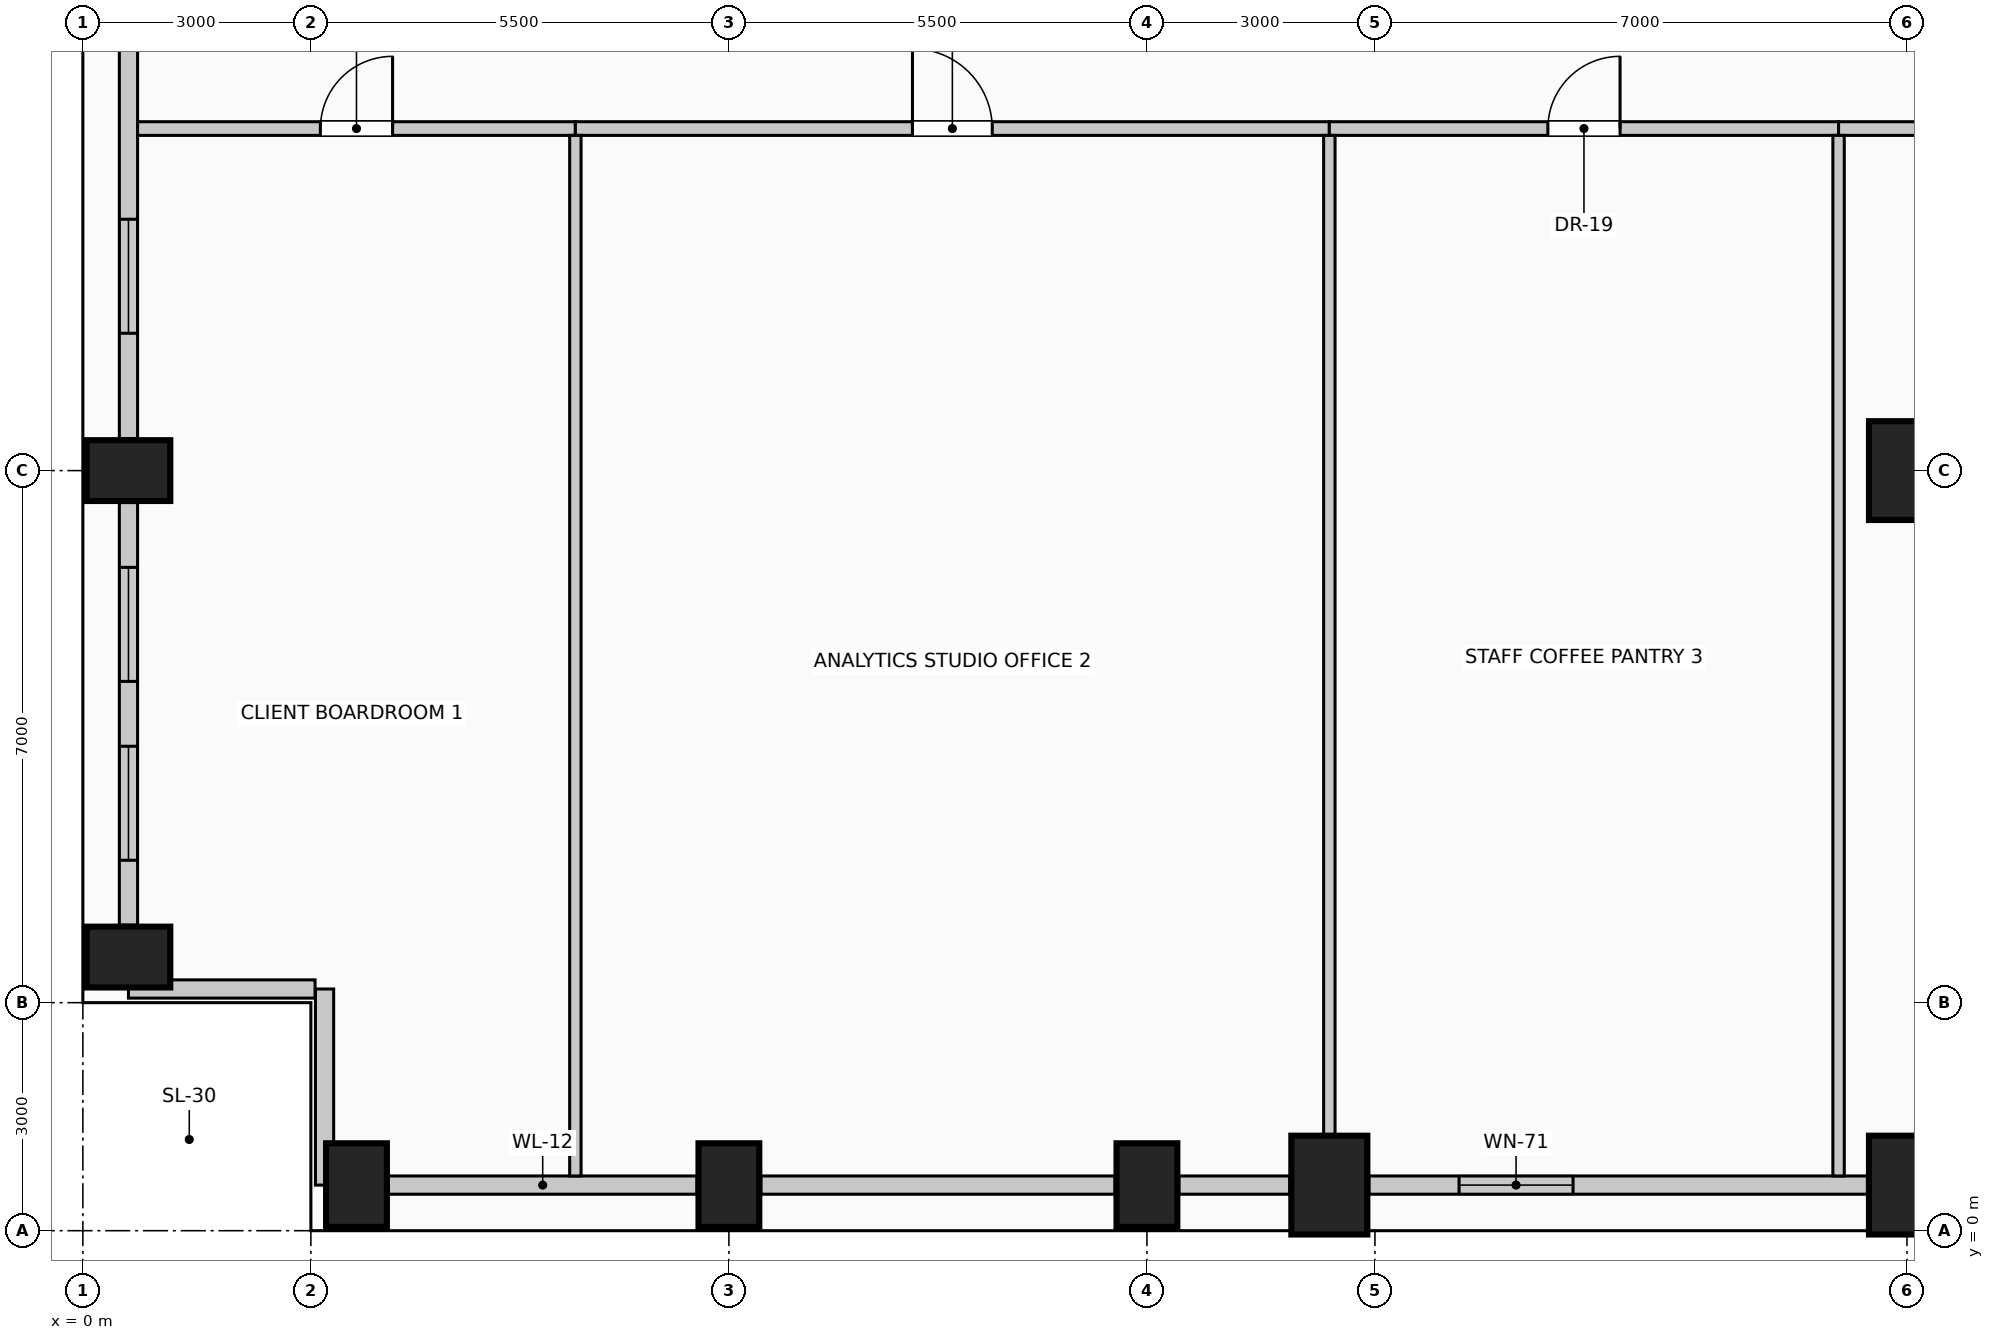
"""IFC4 building model, lengths in metres.
Left out: names, types, materials, properties, quantities, classifications, styles, units other than length and angle.
Written with IfcOpenShell. Run it as: python <this file> out.ifc"""

import sys

from ifc_helpers import new_model, si_unit, direction, frame, frame_2d, origin, origin_2d, place, context, subcontext, project, spatial, rectangle, extrude, element, fill, save


model = new_model("IFC4")
c1 = context("Model", 3, precision=1e-05, world=origin(), true_north=direction((0.0, 1.0)))
c2 = subcontext(c1, "Body", "Model", "MODEL_VIEW")
j1 = project(units=[si_unit("LENGTHUNIT", "METRE"), si_unit("PLANEANGLEUNIT", "RADIAN")], contexts=[c1])
p1 = place(None, origin())
s1 = spatial("IfcSite", under=j1, at=p1, CompositionType="ELEMENT")
p2 = place(p1, origin())
s2 = spatial("IfcBuilding", under=s1, at=p2, CompositionType="ELEMENT")
p3 = place(p2, frame((0.0, 0.0, 210.6)))
s3 = spatial("IfcBuildingStorey", under=s2, at=p3, CompositionType="ELEMENT", Elevation=210.6)
for number, where, z_axis, x_axis in (
    (1, (3.6, 0.6, 0.0), (0.0, 0.0, 1.0), (1.0, 0.0, 0.0)),
    (2, (8.5, 0.6, 0.0), (0.0, 0.0, 1.0), (1.0, 0.0, 0.0)),
    (3, (14.0, 0.6, 0.0), (0.0, 0.0, 1.0), (1.0, 0.0, 0.0)),
):
    element("IfcColumn", number, at=place(p3, frame(where, z_axis=z_axis, x_axis=x_axis)), inside=s3, PredefinedType="COLUMN", context=c2, shape_type="SweptSolid", body=[
        extrude(rectangle(XDim=0.8, YDim=1.1, at=origin_2d()), origin(), (0.0, 0.0, 1.0), 4.0),
    ])
for number, where, z_axis, x_axis in (
    (4, (16.4, 0.6, 0.0), (0.0, 0.0, 1.0), (1.0, 0.0, 0.0)),
    (5, (24.0, 0.6, 0.0), (0.0, 0.0, 1.0), (1.0, 0.0, 0.0)),
):
    element("IfcColumn", number, at=place(p3, frame(where, z_axis=z_axis, x_axis=x_axis)), inside=s3, PredefinedType="COLUMN", context=c2, shape_type="SweptSolid", body=[
        extrude(rectangle(XDim=1.0, YDim=1.3, at=origin_2d()), origin(), (0.0, 0.0, 1.0), 4.0),
    ])
for number, where, z_axis, x_axis in (
    (6, (0.6, 3.6, 0.0), (0.0, 0.0, 1.0), (0.0, 1.0, 0.0)),
    (7, (0.6, 10.0, 0.0), (0.0, 0.0, 1.0), (0.0, 1.0, 0.0)),
):
    element("IfcColumn", number, at=place(p3, frame(where, z_axis=z_axis, x_axis=x_axis)), inside=s3, PredefinedType="COLUMN", context=c2, shape_type="SweptSolid", body=[
        extrude(rectangle(XDim=0.8, YDim=1.1, at=origin_2d()), origin(), (0.0, 0.0, 1.0), 4.0),
    ])
p4 = place(p3, frame((24.0, 10.0, 0.0), z_axis=(0.0, 0.0, 1.0), x_axis=(1.0, 0.0, 0.0)))
e8 = element("IfcColumn", 8, at=p4, inside=s3, PredefinedType="COLUMN", context=c2, shape_type="SweptSolid", body=[
    extrude(rectangle(XDim=1.0, YDim=1.3, at=origin_2d()), origin(), (0.0, 0.0, 1.0), 4.0),
])
p5 = place(p3, frame((8.08, 0.6, 0.0), z_axis=(0.0, 0.0, 1.0), x_axis=(-1.0, 0.0, 0.0)))
e9 = element("IfcWall", 9, at=p5, inside=s3, PredefinedType="SOLIDWALL", context=c2, shape_type="SweptSolid", body=[
    extrude(rectangle(XDim=4.06, YDim=0.24, at=frame_2d((2.03, 0.0))), origin(), (0.0, 0.0, 1.0), 3.0),
])
p6 = place(p3, frame((13.58, 0.6, 0.0), z_axis=(0.0, 0.0, 1.0), x_axis=(-1.0, 0.0, 0.0)))
e10 = element("IfcWall", 10, at=p6, inside=s3, PredefinedType="SOLIDWALL", context=c2, shape_type="SweptSolid", body=[
    extrude(rectangle(XDim=4.66, YDim=0.24, at=frame_2d((2.33, 0.0))), origin(), (0.0, 0.0, 1.0), 3.0),
])
p7 = place(p3, frame((15.88, 0.6, 0.0), z_axis=(0.0, 0.0, 1.0), x_axis=(-1.0, 0.0, 0.0)))
e11 = element("IfcWall", 11, at=p7, inside=s3, PredefinedType="SOLIDWALL", context=c2, shape_type="SweptSolid", body=[
    extrude(rectangle(XDim=1.46, YDim=0.24, at=frame_2d((0.73, 0.0))), origin(), (0.0, 0.0, 1.0), 3.0),
])
p8 = place(p3, frame((23.48, 0.6, 0.0), z_axis=(0.0, 0.0, 1.0), x_axis=(-1.0, 0.0, 0.0)))
e12 = element("IfcWall", 12, at=p8, inside=s3, PredefinedType="SOLIDWALL", context=c2, shape_type="SweptSolid", body=[
    extrude(rectangle(XDim=6.56, YDim=0.24, at=frame_2d((3.28, 0.0))), origin(), (0.0, 0.0, 1.0), 3.0),
])
p9 = place(p8, frame((3.873, 0.0, 0.42)))
e13 = element("IfcOpeningElement", 13, at=p9, cuts=e12, PredefinedType="OPENING", context=c2, shape_type="SweptSolid", body=[
    extrude(rectangle(XDim=1.5, YDim=2.2, at=frame_2d((0.75, 1.1))), frame((0.0, 0.13, 0.0), z_axis=(0.0, -1.0, 0.0), x_axis=(1.0, 0.0, 0.0)), (0.0, 0.0, 1.0), 0.26),
])
p10 = place(p3, frame((0.6, 4.02, 0.0), z_axis=(0.0, 0.0, 1.0), x_axis=(0.0, 1.0, 0.0)))
e14 = element("IfcWall", 14, at=p10, inside=s3, PredefinedType="SOLIDWALL", context=c2, shape_type="SweptSolid", body=[
    extrude(rectangle(XDim=5.56, YDim=0.24, at=frame_2d((2.78, 0.0))), origin(), (0.0, 0.0, 1.0), 3.0),
])
p11 = place(p10, frame((0.853, 0.0, 0.42)))
e15 = element("IfcOpeningElement", 15, at=p11, cuts=e14, PredefinedType="OPENING", context=c2, shape_type="SweptSolid", body=[
    extrude(rectangle(XDim=1.5, YDim=2.2, at=frame_2d((0.75, 1.1))), frame((0.0, 0.13, 0.0), z_axis=(0.0, -1.0, 0.0), x_axis=(1.0, 0.0, 0.0)), (0.0, 0.0, 1.0), 0.26),
])
p12 = place(p10, frame((3.207, 0.0, 0.42)))
e16 = element("IfcOpeningElement", 16, at=p12, cuts=e14, PredefinedType="OPENING", context=c2, shape_type="SweptSolid", body=[
    extrude(rectangle(XDim=1.5, YDim=2.2, at=frame_2d((0.75, 1.1))), frame((0.0, 0.13, 0.0), z_axis=(0.0, -1.0, 0.0), x_axis=(1.0, 0.0, 0.0)), (0.0, 0.0, 1.0), 0.26),
])
p13 = place(p3, frame((0.6, 10.42, 0.0), z_axis=(0.0, 0.0, 1.0), x_axis=(0.0, 1.0, 0.0)))
e17 = element("IfcWall", 17, at=p13, inside=s3, PredefinedType="SOLIDWALL", context=c2, shape_type="SweptSolid", body=[
    extrude(rectangle(XDim=7.16, YDim=0.24, at=frame_2d((3.58, 0.0))), origin(), (0.0, 0.0, 1.0), 3.0),
])
p14 = place(p13, frame((1.387, 0.0, 0.42)))
e18 = element("IfcOpeningElement", 18, at=p14, cuts=e17, PredefinedType="OPENING", context=c2, shape_type="SweptSolid", body=[
    extrude(rectangle(XDim=1.5, YDim=2.2, at=frame_2d((0.75, 1.1))), frame((0.0, 0.13, 0.0), z_axis=(0.0, -1.0, 0.0), x_axis=(1.0, 0.0, 0.0)), (0.0, 0.0, 1.0), 0.26),
])
p15 = place(p3, frame((3.18, 0.6, 0.0), z_axis=(0.0, 0.0, 1.0), x_axis=(0.0, 1.0, 0.0)))
e19 = element("IfcWall", 19, at=p15, inside=s3, PredefinedType="SOLIDWALL", context=c2, shape_type="SweptSolid", body=[
    extrude(rectangle(XDim=2.58, YDim=0.24, at=frame_2d((1.29, 0.0))), origin(), (0.0, 0.0, 1.0), 3.75),
])
p16 = place(p3, frame((3.055, 3.18, 0.0), z_axis=(0.0, 0.0, 1.0), x_axis=(-1.0, 0.0, 0.0)))
e20 = element("IfcWall", 20, at=p16, inside=s3, PredefinedType="SOLIDWALL", context=c2, shape_type="SweptSolid", body=[
    extrude(rectangle(XDim=2.455, YDim=0.24, at=frame_2d((1.228, 0.0))), origin(), (0.0, 0.0, 1.0), 3.75),
])
p17 = place(p3, frame((0.72, 14.5, 0.0), z_axis=(0.0, 0.0, 1.0), x_axis=(1.0, 0.0, 0.0)))
e21 = element("IfcWall", 21, at=p17, inside=s3, PredefinedType="PARTITIONING", context=c2, shape_type="SweptSolid", body=[
    extrude(rectangle(XDim=5.76, YDim=0.18, at=frame_2d((2.88, 0.0))), origin(), (0.0, 0.0, 1.0), 3.75),
])
p18 = place(p17, frame((2.405, 0.0, 0.0)))
e22 = element("IfcOpeningElement", 22, at=p18, cuts=e21, PredefinedType="OPENING", context=c2, shape_type="SweptSolid", body=[
    extrude(rectangle(XDim=0.95, YDim=2.15, at=frame_2d((0.475, 1.075))), frame((0.0, 0.1, 0.0), z_axis=(0.0, -1.0, 0.0), x_axis=(1.0, 0.0, 0.0)), (0.0, 0.0, 1.0), 0.2),
])
p19 = place(p3, frame((6.48, 14.5, 0.0), z_axis=(0.0, 0.0, 1.0), x_axis=(1.0, 0.0, 0.0)))
e23 = element("IfcWall", 23, at=p19, inside=s3, PredefinedType="PARTITIONING", context=c2, shape_type="SweptSolid", body=[
    extrude(rectangle(XDim=9.92, YDim=0.18, at=frame_2d((4.96, 0.0))), origin(), (0.0, 0.0, 1.0), 3.75),
])
p20 = place(p19, frame((4.435, 0.0, 0.0)))
e24 = element("IfcOpeningElement", 24, at=p20, cuts=e23, PredefinedType="OPENING", context=c2, shape_type="SweptSolid", body=[
    extrude(rectangle(XDim=1.05, YDim=2.15, at=frame_2d((0.525, 1.075))), frame((0.0, 0.1, 0.0), z_axis=(0.0, -1.0, 0.0), x_axis=(1.0, 0.0, 0.0)), (0.0, 0.0, 1.0), 0.2),
])
p21 = place(p3, frame((16.4, 14.5, 0.0), z_axis=(0.0, 0.0, 1.0), x_axis=(1.0, 0.0, 0.0)))
e25 = element("IfcWall", 25, at=p21, inside=s3, PredefinedType="PARTITIONING", context=c2, shape_type="SweptSolid", body=[
    extrude(rectangle(XDim=6.7, YDim=0.18, at=frame_2d((3.35, 0.0))), origin(), (0.0, 0.0, 1.0), 3.75),
])
p22 = place(p21, frame((2.875, 0.0, 0.0)))
e26 = element("IfcOpeningElement", 26, at=p22, cuts=e25, PredefinedType="OPENING", context=c2, shape_type="SweptSolid", body=[
    extrude(rectangle(XDim=0.95, YDim=2.15, at=frame_2d((0.475, 1.075))), frame((0.0, 0.1, 0.0), z_axis=(0.0, -1.0, 0.0), x_axis=(1.0, 0.0, 0.0)), (0.0, 0.0, 1.0), 0.2),
])
p23 = place(p3, frame((23.1, 14.5, 0.0), z_axis=(0.0, 0.0, 1.0), x_axis=(1.0, 0.0, 0.0)))
e27 = element("IfcWall", 27, at=p23, inside=s3, PredefinedType="PARTITIONING", context=c2, shape_type="SweptSolid", body=[
    extrude(rectangle(XDim=13.38, YDim=0.18, at=frame_2d((6.69, 0.0))), origin(), (0.0, 0.0, 1.0), 3.75),
])
p24 = place(p23, frame((6.165, 0.0, 0.0)))
e28 = element("IfcOpeningElement", 28, at=p24, cuts=e27, PredefinedType="OPENING", context=c2, shape_type="SweptSolid", body=[
    extrude(rectangle(XDim=1.05, YDim=2.15, at=frame_2d((0.525, 1.075))), frame((0.0, 0.1, 0.0), z_axis=(0.0, -1.0, 0.0), x_axis=(1.0, 0.0, 0.0)), (0.0, 0.0, 1.0), 0.2),
])
p25 = place(p3, frame((6.48, 0.72, 0.0), z_axis=(0.0, 0.0, 1.0), x_axis=(0.0, 1.0, 0.0)))
e29 = element("IfcWall", 29, at=p25, inside=s3, PredefinedType="PARTITIONING", context=c2, shape_type="SweptSolid", body=[
    extrude(rectangle(XDim=13.69, YDim=0.15, at=frame_2d((6.845, 0.0))), origin(), (0.0, 0.0, 1.0), 3.75),
])
p26 = place(p3, frame((16.4, 1.25, 0.0), z_axis=(0.0, 0.0, 1.0), x_axis=(0.0, 1.0, 0.0)))
e30 = element("IfcWall", 30, at=p26, inside=s3, PredefinedType="PARTITIONING", context=c2, shape_type="SweptSolid", body=[
    extrude(rectangle(XDim=13.16, YDim=0.15, at=frame_2d((6.58, 0.0))), origin(), (0.0, 0.0, 1.0), 3.145),
])
p27 = place(p3, frame((23.1, 0.72, 0.0), z_axis=(0.0, 0.0, 1.0), x_axis=(0.0, 1.0, 0.0)))
e31 = element("IfcWall", 31, at=p27, inside=s3, PredefinedType="PARTITIONING", context=c2, shape_type="SweptSolid", body=[
    extrude(rectangle(XDim=13.69, YDim=0.15, at=frame_2d((6.845, 0.0))), origin(), (0.0, 0.0, 1.0), 3.75),
])
p28 = place(p9, origin())
e32 = element("IfcWindow", 32, at=p28, inside=s3, PartitioningType="SINGLE_PANEL", PredefinedType="WINDOW", context=c2, shape_type="SweptSolid", body=[
    extrude(rectangle(XDim=1.5, YDim=2.2, at=frame_2d((0.75, 1.1))), frame((0.0, 0.03, 0.0), z_axis=(0.0, -1.0, 0.0), x_axis=(1.0, 0.0, 0.0)), (0.0, 0.0, 1.0), 0.06),
])
fill(e13, e32)
p29 = place(p11, origin())
e33 = element("IfcWindow", 33, at=p29, inside=s3, PartitioningType="SINGLE_PANEL", PredefinedType="WINDOW", context=c2, shape_type="SweptSolid", body=[
    extrude(rectangle(XDim=1.5, YDim=2.2, at=frame_2d((0.75, 1.1))), frame((0.0, 0.03, 0.0), z_axis=(0.0, -1.0, 0.0), x_axis=(1.0, 0.0, 0.0)), (0.0, 0.0, 1.0), 0.06),
])
fill(e15, e33)
p30 = place(p12, origin())
e34 = element("IfcWindow", 34, at=p30, inside=s3, PartitioningType="SINGLE_PANEL", PredefinedType="WINDOW", context=c2, shape_type="SweptSolid", body=[
    extrude(rectangle(XDim=1.5, YDim=2.2, at=frame_2d((0.75, 1.1))), frame((0.0, 0.03, 0.0), z_axis=(0.0, -1.0, 0.0), x_axis=(1.0, 0.0, 0.0)), (0.0, 0.0, 1.0), 0.06),
])
fill(e16, e34)
p31 = place(p14, origin())
e35 = element("IfcWindow", 35, at=p31, inside=s3, PartitioningType="SINGLE_PANEL", PredefinedType="WINDOW", context=c2, shape_type="SweptSolid", body=[
    extrude(rectangle(XDim=1.5, YDim=2.2, at=frame_2d((0.75, 1.1))), frame((0.0, 0.03, 0.0), z_axis=(0.0, -1.0, 0.0), x_axis=(1.0, 0.0, 0.0)), (0.0, 0.0, 1.0), 0.06),
])
fill(e18, e35)
p32 = place(p18, origin())
e36 = element("IfcDoor", 36, at=p32, inside=s3, OperationType="SINGLE_SWING_RIGHT", PredefinedType="DOOR", context=c2, shape_type="SweptSolid", body=[
    extrude(rectangle(XDim=0.95, YDim=2.15, at=frame_2d((0.475, 1.075))), frame((0.0, 0.025, 0.0), z_axis=(0.0, -1.0, 0.0), x_axis=(1.0, 0.0, 0.0)), (0.0, 0.0, 1.0), 0.05),
])
fill(e22, e36)
p33 = place(p20, origin())
e37 = element("IfcDoor", 37, at=p33, inside=s3, OperationType="SINGLE_SWING_LEFT", PredefinedType="DOOR", context=c2, shape_type="SweptSolid", body=[
    extrude(rectangle(XDim=1.05, YDim=2.15, at=frame_2d((0.525, 1.075))), frame((0.0, 0.025, 0.0), z_axis=(0.0, -1.0, 0.0), x_axis=(1.0, 0.0, 0.0)), (0.0, 0.0, 1.0), 0.05),
])
fill(e24, e37)
p34 = place(p22, origin())
e38 = element("IfcDoor", 38, at=p34, inside=s3, OperationType="SINGLE_SWING_RIGHT", PredefinedType="DOOR", context=c2, shape_type="SweptSolid", body=[
    extrude(rectangle(XDim=0.95, YDim=2.15, at=frame_2d((0.475, 1.075))), frame((0.0, 0.025, 0.0), z_axis=(0.0, -1.0, 0.0), x_axis=(1.0, 0.0, 0.0)), (0.0, 0.0, 1.0), 0.05),
])
fill(e26, e38)
save(model, sys.argv[1])
